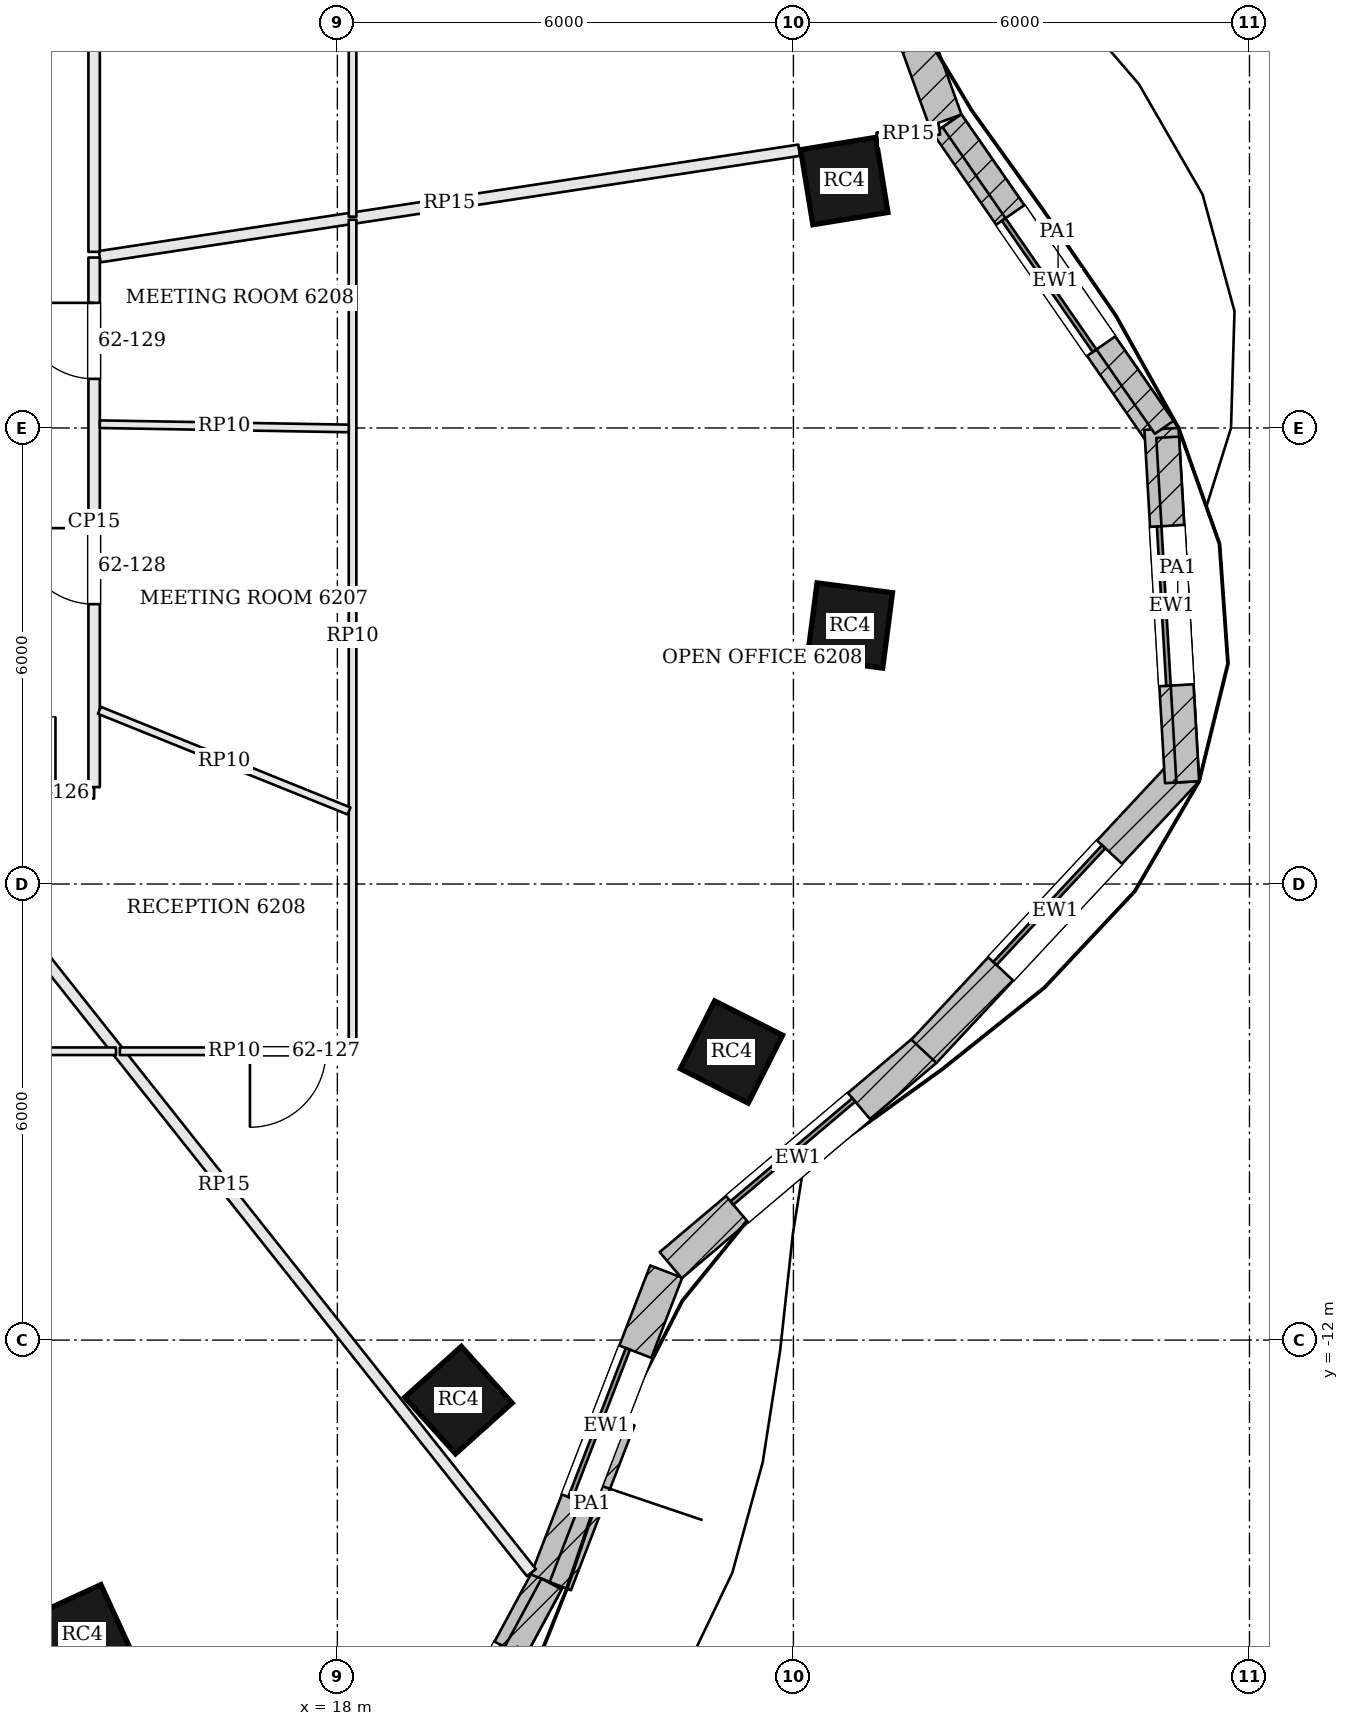
"""IFC4 building model, lengths in metres.
Left out: names, types, materials, properties, quantities, classifications, styles, units other than length and angle.
Written with IfcOpenShell. Run it as: python <this file> out.ifc"""

import sys

from ifc_helpers import new_model, si_unit, direction, frame, frame_2d, origin, origin_2d, place, context, subcontext, project, spatial, rectangle, extrude, element, fill, save


model = new_model("IFC4")
c1 = context("Model", 3, precision=1e-05, world=origin(), true_north=direction((0.0, 1.0)))
c2 = subcontext(c1, "Body", "Model", "MODEL_VIEW")
j1 = project(units=[si_unit("LENGTHUNIT", "METRE"), si_unit("PLANEANGLEUNIT", "RADIAN")], contexts=[c1])
p1 = place(None, origin())
s1 = spatial("IfcSite", under=j1, at=p1, CompositionType="ELEMENT")
p2 = place(p1, origin())
s2 = spatial("IfcBuilding", under=s1, at=p2, CompositionType="ELEMENT")
p3 = place(p2, frame((0.0, 0.0, 252.6)))
s3 = spatial("IfcBuildingStorey", under=s2, at=p3, CompositionType="ELEMENT", Elevation=252.6)
for number, where, z_axis, x_axis in (
    (1, (24.669, 3.248, 0.0), (0.0, 0.0, 1.0), (-0.162, 0.987, 0.0)),
    (2, (14.643, -15.881, 0.0), (0.0, 0.0, 1.0), (0.909, 0.417, 0.0)),
    (3, (19.593, -12.79, 0.0), (0.0, 0.0, 1.0), (0.744, 0.668, 0.0)),
    (4, (23.185, -8.21, 0.0), (0.0, 0.0, 1.0), (0.451, 0.893, 0.0)),
    (5, (24.743, -2.599, 0.0), (0.0, 0.0, 1.0), (0.128, 0.992, 0.0)),
):
    element("IfcColumn", number, at=place(p3, frame(where, z_axis=z_axis, x_axis=x_axis)), inside=s3, PredefinedType="COLUMN", context=c2, shape_type="SweptSolid", body=[
        extrude(rectangle(XDim=1.0, YDim=1.0, at=origin_2d()), origin(), (0.0, 0.0, 1.0), 3.9),
    ])
p4 = place(p3, frame((28.878, -0.123, 0.0), z_axis=(0.0, 0.0, 1.0), x_axis=(-0.569394732999, 0.8220642542, 0.0)))
e6 = element("IfcWall", 6, at=p4, inside=s3, PredefinedType="SOLIDWALL", context=c2, shape_type="SweptSolid", body=[
    extrude(rectangle(XDim=5.016, YDim=0.45, at=frame_2d((2.508, 0.0))), origin(), (0.0, 0.0, 1.0), 3.7),
])
p5 = place(p4, frame((1.458, 0.0, 0.9)))
e7 = element("IfcOpeningElement", 7, at=p5, cuts=e6, PredefinedType="OPENING", context=c2, shape_type="SweptSolid", body=[
    extrude(rectangle(XDim=2.1, YDim=2.3, at=frame_2d((1.05, 1.15))), frame((0.0, 0.235, 0.0), z_axis=(0.0, -1.0, 0.0), x_axis=(1.0, 0.0, 0.0)), (0.0, 0.0, 1.0), 0.47),
])
p6 = place(p3, frame((26.0, 4.047, 0.0), z_axis=(0.0, 0.0, 1.0), x_axis=(-0.338924456066, 0.940813591037, 0.0)))
e8 = element("IfcWall", 8, at=p6, inside=s3, PredefinedType="SOLIDWALL", context=c2, shape_type="SweptSolid", body=[
    extrude(rectangle(XDim=4.175, YDim=0.45, at=frame_2d((2.087, 0.0))), origin(), (0.0, 0.0, 1.0), 3.7),
])
p7 = place(p6, frame((1.038, 0.0, 0.9)))
e9 = element("IfcOpeningElement", 9, at=p7, cuts=e8, PredefinedType="OPENING", context=c2, shape_type="SweptSolid", body=[
    extrude(rectangle(XDim=2.1, YDim=2.3, at=frame_2d((1.05, 1.15))), frame((0.0, 0.235, 0.0), z_axis=(0.0, -1.0, 0.0), x_axis=(1.0, 0.0, 0.0)), (0.0, 0.0, 1.0), 0.47),
])
p8 = place(p3, frame((18.767, -18.854, 0.0), z_axis=(0.0, 0.0, 1.0), x_axis=(0.474475888716, 0.880268499395, 0.0)))
e10 = element("IfcWall", 10, at=p8, inside=s3, PredefinedType="SOLIDWALL", context=c2, shape_type="SweptSolid", body=[
    extrude(rectangle(XDim=4.219, YDim=0.45, at=frame_2d((2.11, 0.0))), origin(), (0.0, 0.0, 1.0), 3.7),
])
p9 = place(p8, frame((1.06, 0.0, 0.9)))
e11 = element("IfcOpeningElement", 11, at=p9, cuts=e10, PredefinedType="OPENING", context=c2, shape_type="SweptSolid", body=[
    extrude(rectangle(XDim=2.1, YDim=2.3, at=frame_2d((1.05, 1.15))), frame((0.0, 0.235, 0.0), z_axis=(0.0, -1.0, 0.0), x_axis=(1.0, 0.0, 0.0)), (0.0, 0.0, 1.0), 0.47),
])
p10 = place(p3, frame((20.757, -15.166, 0.0), z_axis=(0.0, 0.0, 1.0), x_axis=(0.360067043581, 0.932926430179, 0.0)))
e12 = element("IfcWall", 12, at=p10, inside=s3, PredefinedType="SOLIDWALL", context=c2, shape_type="SweptSolid", body=[
    extrude(rectangle(XDim=4.36, YDim=0.45, at=frame_2d((2.18, 0.0))), origin(), (0.0, 0.0, 1.0), 3.7),
])
p11 = place(p10, frame((1.13, 0.0, 0.9)))
e13 = element("IfcOpeningElement", 13, at=p11, cuts=e12, PredefinedType="OPENING", context=c2, shape_type="SweptSolid", body=[
    extrude(rectangle(XDim=2.1, YDim=2.3, at=frame_2d((1.05, 1.15))), frame((0.0, 0.235, 0.0), z_axis=(0.0, -1.0, 0.0), x_axis=(1.0, 0.0, 0.0)), (0.0, 0.0, 1.0), 0.47),
])
p12 = place(p3, frame((22.386, -11.014, 0.0), z_axis=(0.0, 0.0, 1.0), x_axis=(0.763569952162, 0.645725118108, 0.0)))
e14 = element("IfcWall", 14, at=p12, inside=s3, PredefinedType="SOLIDWALL", context=c2, shape_type="SweptSolid", body=[
    extrude(rectangle(XDim=4.386, YDim=0.45, at=frame_2d((2.193, 0.0))), origin(), (0.0, 0.0, 1.0), 3.7),
])
p13 = place(p12, frame((1.143, 0.0, 0.9)))
e15 = element("IfcOpeningElement", 15, at=p13, cuts=e14, PredefinedType="OPENING", context=c2, shape_type="SweptSolid", body=[
    extrude(rectangle(XDim=2.1, YDim=2.3, at=frame_2d((1.05, 1.15))), frame((0.0, 0.235, 0.0), z_axis=(0.0, -1.0, 0.0), x_axis=(1.0, 0.0, 0.0)), (0.0, 0.0, 1.0), 0.47),
])
p14 = place(p3, frame((25.717, -8.201, 0.0), z_axis=(0.0, 0.0, 1.0), x_axis=(0.681990073025, 0.731361429319, 0.0)))
e16 = element("IfcWall", 16, at=p14, inside=s3, PredefinedType="SOLIDWALL", context=c2, shape_type="SweptSolid", body=[
    extrude(rectangle(XDim=5.064, YDim=0.45, at=frame_2d((2.532, 0.0))), origin(), (0.0, 0.0, 1.0), 3.7),
])
p15 = place(p14, frame((1.482, 0.0, 0.9)))
e17 = element("IfcOpeningElement", 17, at=p15, cuts=e16, PredefinedType="OPENING", context=c2, shape_type="SweptSolid", body=[
    extrude(rectangle(XDim=2.1, YDim=2.3, at=frame_2d((1.05, 1.15))), frame((0.0, 0.235, 0.0), z_axis=(0.0, -1.0, 0.0), x_axis=(1.0, 0.0, 0.0)), (0.0, 0.0, 1.0), 0.47),
])
p16 = place(p3, frame((29.113, -4.66, 0.0), z_axis=(0.0, 0.0, 1.0), x_axis=(-0.058217785859, 0.998303906338, 0.0)))
e18 = element("IfcWall", 18, at=p16, inside=s3, PredefinedType="SOLIDWALL", context=c2, shape_type="SweptSolid", body=[
    extrude(rectangle(XDim=4.655, YDim=0.45, at=frame_2d((2.327, 0.0))), origin(), (0.0, 0.0, 1.0), 3.7),
])
p17 = place(p16, frame((1.277, 0.0, 0.9)))
e19 = element("IfcOpeningElement", 19, at=p17, cuts=e18, PredefinedType="OPENING", context=c2, shape_type="SweptSolid", body=[
    extrude(rectangle(XDim=2.1, YDim=2.3, at=frame_2d((1.05, 1.15))), frame((0.0, 0.235, 0.0), z_axis=(0.0, -1.0, 0.0), x_axis=(1.0, 0.0, 0.0)), (0.0, 0.0, 1.0), 0.47),
])
p18 = place(p3, frame((28.879, 0.009, 3.9), z_axis=(0.0, 0.0, 1.0), x_axis=(-0.569370412902, 0.822081098744, 0.0)))
e20 = element("IfcWall", 20, at=p18, inside=s3, PredefinedType="PARAPET", context=c2, shape_type="SweptSolid", body=[
    extrude(rectangle(XDim=4.906, YDim=0.3, at=frame_2d((2.453, 0.0))), origin(), (0.0, 0.0, 1.0), 1.1),
])
p19 = place(p3, frame((18.896, -18.773, 3.9), z_axis=(0.0, 0.0, 1.0), x_axis=(0.474444905835, 0.880285198857, 0.0)))
e21 = element("IfcWall", 21, at=p19, inside=s3, PredefinedType="PARAPET", context=c2, shape_type="SweptSolid", body=[
    extrude(rectangle(XDim=4.05, YDim=0.3, at=frame_2d((2.025, 0.0))), origin(), (0.0, 0.0, 1.0), 1.1),
])
p20 = place(p3, frame((20.933, -15.237, 3.9), z_axis=(0.0, 0.0, 1.0), x_axis=(0.360021038217, 0.932944184848, 0.0)))
e22 = element("IfcWall", 22, at=p20, inside=s3, PredefinedType="PARAPET", context=c2, shape_type="SweptSolid", body=[
    extrude(rectangle(XDim=2.323, YDim=0.3, at=frame_2d((1.162, 0.0))), origin(), (0.0, 0.0, 1.0), 1.1),
])
p21 = place(p3, frame((29.188, -4.656, 3.9), z_axis=(0.0, 0.0, 1.0), x_axis=(-0.058230319325, 0.998303175349, 0.0)))
e23 = element("IfcWall", 23, at=p21, inside=s3, PredefinedType="PARAPET", context=c2, shape_type="SweptSolid", body=[
    extrude(rectangle(XDim=4.541, YDim=0.3, at=frame_2d((2.271, 0.0))), origin(), (0.0, 0.0, 1.0), 1.1),
])
p22 = place(p3, frame((20.553, -15.059, 0.0), z_axis=(0.0, 0.0, 1.0), x_axis=(-0.621387168857, 0.783503660732, 0.0)))
e24 = element("IfcWall", 24, at=p22, inside=s3, PredefinedType="PARTITIONING", context=c2, shape_type="SweptSolid", body=[
    extrude(rectangle(XDim=13.019, YDim=0.15, at=frame_2d((6.51, 0.0))), origin(), (0.0, 0.0, 1.0), 3.084),
])
p23 = place(p3, frame((12.491, -4.8, 0.0), z_axis=(0.0, 0.0, 1.0), x_axis=(1.0, 0.0, 0.0)))
e25 = element("IfcWall", 25, at=p23, inside=s3, PredefinedType="PARTITIONING", context=c2, shape_type="SweptSolid", body=[
    extrude(rectangle(XDim=2.309, YDim=0.15, at=frame_2d((1.154, 0.0))), origin(), (0.0, 0.0, 1.0), 3.084),
])
p24 = place(p23, frame((0.8, 0.0, 0.0)))
e26 = element("IfcOpeningElement", 26, at=p24, cuts=e25, PredefinedType="OPENING", context=c2, shape_type="SweptSolid", body=[
    extrude(rectangle(XDim=1.0, YDim=2.1, at=frame_2d((0.5, 1.05))), frame((0.0, 0.085, 0.0), z_axis=(0.0, -1.0, 0.0), x_axis=(1.0, 0.0, 0.0)), (0.0, 0.0, 1.0), 0.17),
])
p25 = place(p3, frame((14.8, -4.725, 0.0), z_axis=(0.0, 0.0, 1.0), x_axis=(0.0, 1.0, 0.0)))
e27 = element("IfcWall", 27, at=p25, inside=s3, PredefinedType="PARTITIONING", context=c2, shape_type="SweptSolid", body=[
    extrude(rectangle(XDim=6.967, YDim=0.15, at=frame_2d((3.483, 0.0))), origin(), (0.0, 0.0, 1.0), 3.084),
])
p26 = place(p25, frame((2.407, 0.0, 0.0)))
e28 = element("IfcOpeningElement", 28, at=p26, cuts=e27, PredefinedType="OPENING", context=c2, shape_type="SweptSolid", body=[
    extrude(rectangle(XDim=1.0, YDim=2.4, at=frame_2d((0.5, 1.2))), frame((0.0, 0.085, 0.0), z_axis=(0.0, -1.0, 0.0), x_axis=(1.0, 0.0, 0.0)), (0.0, 0.0, 1.0), 0.17),
])
p27 = place(p25, frame((5.371, 0.0, 0.0)))
e29 = element("IfcOpeningElement", 29, at=p27, cuts=e27, PredefinedType="OPENING", context=c2, shape_type="SweptSolid", body=[
    extrude(rectangle(XDim=1.0, YDim=2.4, at=frame_2d((0.5, 1.2))), frame((0.0, 0.085, 0.0), z_axis=(0.0, -1.0, 0.0), x_axis=(1.0, 0.0, 0.0)), (0.0, 0.0, 1.0), 0.17),
])
p28 = place(p3, frame((25.92, 3.935, 0.0), z_axis=(0.0, 0.0, 1.0), x_axis=(-0.988606403982, -0.150523679218, 0.0)))
e30 = element("IfcWall", 30, at=p28, inside=s3, PredefinedType="PARTITIONING", context=c2, shape_type="SweptSolid", body=[
    extrude(rectangle(XDim=0.826, YDim=0.15, at=frame_2d((0.413, 0.0))), origin(), (0.0, 0.0, 1.0), 3.084),
])
p29 = place(p3, frame((24.076, 3.654, 0.0), z_axis=(0.0, 0.0, 1.0), x_axis=(-0.988612730302, -0.150482123474, 0.0)))
e31 = element("IfcWall", 31, at=p29, inside=s3, PredefinedType="PARTITIONING", context=c2, shape_type="SweptSolid", body=[
    extrude(rectangle(XDim=9.308, YDim=0.15, at=frame_2d((4.654, 0.0))), origin(), (0.0, 0.0, 1.0), 3.084),
])
p30 = place(p3, frame((14.8, 2.317, 0.0), z_axis=(0.0, 0.0, 1.0), x_axis=(0.0, 1.0, 0.0)))
e32 = element("IfcWall", 32, at=p30, inside=s3, PredefinedType="PARTITIONING", context=c2, shape_type="SweptSolid", body=[
    extrude(rectangle(XDim=11.483, YDim=0.15, at=frame_2d((5.742, 0.0))), origin(), (0.0, 0.0, 1.0), 3.084),
])
p31 = place(p30, frame((6.341, 0.0, 0.0)))
e33 = element("IfcOpeningElement", 33, at=p31, cuts=e32, PredefinedType="OPENING", context=c2, shape_type="SweptSolid", body=[
    extrude(rectangle(XDim=1.8, YDim=2.1, at=frame_2d((0.9, 1.05))), frame((0.0, 0.085, 0.0), z_axis=(0.0, -1.0, 0.0), x_axis=(1.0, 0.0, 0.0)), (0.0, 0.0, 1.0), 0.17),
])
p32 = place(p3, frame((15.087, -8.2, 0.0), z_axis=(0.0, 0.0, 1.0), x_axis=(-1.0, 0.0, 0.0)))
e34 = element("IfcWall", 34, at=p32, inside=s3, PredefinedType="PARTITIONING", context=c2, shape_type="SweptSolid", body=[
    extrude(rectangle(XDim=10.081, YDim=0.1, at=frame_2d((5.041, 0.0))), origin(), (0.0, 0.0, 1.0), 3.084),
])
p33 = place(p32, frame((6.841, 0.0, 0.0)))
e35 = element("IfcOpeningElement", 35, at=p33, cuts=e34, PredefinedType="OPENING", context=c2, shape_type="SweptSolid", body=[
    extrude(rectangle(XDim=1.0, YDim=2.1, at=frame_2d((0.5, 1.05))), frame((0.0, 0.06, 0.0), z_axis=(0.0, -1.0, 0.0), x_axis=(1.0, 0.0, 0.0)), (0.0, 0.0, 1.0), 0.12),
])
p34 = place(p3, frame((18.2, 2.74, 0.0), z_axis=(0.0, 0.0, 1.0), x_axis=(0.0, -1.0, 0.0)))
e36 = element("IfcWall", 36, at=p34, inside=s3, PredefinedType="PARTITIONING", context=c2, shape_type="SweptSolid", body=[
    extrude(rectangle(XDim=10.939, YDim=0.1, at=frame_2d((5.47, 0.0))), origin(), (0.0, 0.0, 1.0), 3.084),
])
p35 = place(p3, frame((18.15, -8.2, 0.0), z_axis=(0.0, 0.0, 1.0), x_axis=(-1.0, 0.0, 0.0)))
e37 = element("IfcWall", 37, at=p35, inside=s3, PredefinedType="PARTITIONING", context=c2, shape_type="SweptSolid", body=[
    extrude(rectangle(XDim=3.011, YDim=0.1, at=frame_2d((1.506, 0.0))), origin(), (0.0, 0.0, 1.0), 3.084),
])
p36 = place(p35, frame((0.3, 0.0, 0.0)))
e38 = element("IfcOpeningElement", 38, at=p36, cuts=e37, PredefinedType="OPENING", context=c2, shape_type="SweptSolid", body=[
    extrude(rectangle(XDim=1.0, YDim=2.1, at=frame_2d((0.5, 1.05))), frame((0.0, 0.06, 0.0), z_axis=(0.0, -1.0, 0.0), x_axis=(1.0, 0.0, 0.0)), (0.0, 0.0, 1.0), 0.12),
])
p37 = place(p3, frame((14.87, -3.715, 0.0), z_axis=(0.0, 0.0, 1.0), x_axis=(0.927460371053, -0.37392146251, 0.0)))
e39 = element("IfcWall", 39, at=p37, inside=s3, PredefinedType="PARTITIONING", context=c2, shape_type="SweptSolid", body=[
    extrude(rectangle(XDim=3.541, YDim=0.1, at=frame_2d((1.771, 0.0))), origin(), (0.0, 0.0, 1.0), 3.084),
])
p38 = place(p3, frame((14.875, 0.049, 0.0), z_axis=(0.0, 0.0, 1.0), x_axis=(0.999854310099, -0.017069228941, 0.0)))
e40 = element("IfcWall", 40, at=p38, inside=s3, PredefinedType="PARTITIONING", context=c2, shape_type="SweptSolid", body=[
    extrude(rectangle(XDim=3.275, YDim=0.1, at=frame_2d((1.638, 0.0))), origin(), (0.0, 0.0, 1.0), 3.084),
])
p39 = place(p3, frame((18.2, 14.262, 0.0), z_axis=(0.0, 0.0, 1.0), x_axis=(0.0, -1.0, 0.0)))
e41 = element("IfcWall", 41, at=p39, inside=s3, PredefinedType="PARTITIONING", context=c2, shape_type="SweptSolid", body=[
    extrude(rectangle(XDim=11.482, YDim=0.1, at=frame_2d((5.741, 0.0))), origin(), (0.0, 0.0, 1.0), 3.084),
])
p40 = place(p39, frame((7.25, 0.0, 0.0)))
e42 = element("IfcOpeningElement", 42, at=p40, cuts=e41, PredefinedType="OPENING", context=c2, shape_type="SweptSolid", body=[
    extrude(rectangle(XDim=1.0, YDim=2.1, at=frame_2d((0.5, 1.05))), frame((0.0, 0.06, 0.0), z_axis=(0.0, -1.0, 0.0), x_axis=(1.0, 0.0, 0.0)), (0.0, 0.0, 1.0), 0.12),
])
p41 = place(p5, origin())
e43 = element("IfcWindow", 43, at=p41, inside=s3, PartitioningType="SINGLE_PANEL", PredefinedType="WINDOW", context=c2, shape_type="SweptSolid", body=[
    extrude(rectangle(XDim=2.1, YDim=2.3, at=frame_2d((1.05, 1.15))), frame((0.0, 0.135, 0.0), z_axis=(0.0, -1.0, 0.0), x_axis=(1.0, 0.0, 0.0)), (0.0, 0.0, 1.0), 0.06),
])
fill(e7, e43)
p42 = place(p9, origin())
e44 = element("IfcWindow", 44, at=p42, inside=s3, PartitioningType="SINGLE_PANEL", PredefinedType="WINDOW", context=c2, shape_type="SweptSolid", body=[
    extrude(rectangle(XDim=2.1, YDim=2.3, at=frame_2d((1.05, 1.15))), frame((0.0, 0.135, 0.0), z_axis=(0.0, -1.0, 0.0), x_axis=(1.0, 0.0, 0.0)), (0.0, 0.0, 1.0), 0.06),
])
fill(e11, e44)
p43 = place(p11, origin())
e45 = element("IfcWindow", 45, at=p43, inside=s3, PartitioningType="SINGLE_PANEL", PredefinedType="WINDOW", context=c2, shape_type="SweptSolid", body=[
    extrude(rectangle(XDim=2.1, YDim=2.3, at=frame_2d((1.05, 1.15))), frame((0.0, 0.135, 0.0), z_axis=(0.0, -1.0, 0.0), x_axis=(1.0, 0.0, 0.0)), (0.0, 0.0, 1.0), 0.06),
])
fill(e13, e45)
p44 = place(p13, origin())
e46 = element("IfcWindow", 46, at=p44, inside=s3, PartitioningType="SINGLE_PANEL", PredefinedType="WINDOW", context=c2, shape_type="SweptSolid", body=[
    extrude(rectangle(XDim=2.1, YDim=2.3, at=frame_2d((1.05, 1.15))), frame((0.0, 0.135, 0.0), z_axis=(0.0, -1.0, 0.0), x_axis=(1.0, 0.0, 0.0)), (0.0, 0.0, 1.0), 0.06),
])
fill(e15, e46)
p45 = place(p15, origin())
e47 = element("IfcWindow", 47, at=p45, inside=s3, PartitioningType="SINGLE_PANEL", PredefinedType="WINDOW", context=c2, shape_type="SweptSolid", body=[
    extrude(rectangle(XDim=2.1, YDim=2.3, at=frame_2d((1.05, 1.15))), frame((0.0, 0.135, 0.0), z_axis=(0.0, -1.0, 0.0), x_axis=(1.0, 0.0, 0.0)), (0.0, 0.0, 1.0), 0.06),
])
fill(e17, e47)
p46 = place(p17, origin())
e48 = element("IfcWindow", 48, at=p46, inside=s3, PartitioningType="SINGLE_PANEL", PredefinedType="WINDOW", context=c2, shape_type="SweptSolid", body=[
    extrude(rectangle(XDim=2.1, YDim=2.3, at=frame_2d((1.05, 1.15))), frame((0.0, 0.135, 0.0), z_axis=(0.0, -1.0, 0.0), x_axis=(1.0, 0.0, 0.0)), (0.0, 0.0, 1.0), 0.06),
])
fill(e19, e48)
p47 = place(p24, origin())
e49 = element("IfcDoor", 49, at=p47, inside=s3, OperationType="SINGLE_SWING_RIGHT", PredefinedType="DOOR", context=c2, shape_type="SweptSolid", body=[
    extrude(rectangle(XDim=1.0, YDim=2.1, at=frame_2d((0.5, 1.05))), frame((0.0, 0.025, 0.0), z_axis=(0.0, -1.0, 0.0), x_axis=(1.0, 0.0, 0.0)), (0.0, 0.0, 1.0), 0.05),
])
fill(e26, e49)
p48 = place(p36, origin())
e50 = element("IfcDoor", 50, at=p48, inside=s3, OperationType="SINGLE_SWING_RIGHT", PredefinedType="DOOR", context=c2, shape_type="SweptSolid", body=[
    extrude(rectangle(XDim=1.0, YDim=2.1, at=frame_2d((0.5, 1.05))), frame((0.0, 0.025, 0.0), z_axis=(0.0, -1.0, 0.0), x_axis=(1.0, 0.0, 0.0)), (0.0, 0.0, 1.0), 0.05),
])
fill(e38, e50)
p49 = place(p26, origin())
e51 = element("IfcDoor", 51, at=p49, inside=s3, OperationType="SINGLE_SWING_RIGHT", PredefinedType="DOOR", context=c2, shape_type="SweptSolid", body=[
    extrude(rectangle(XDim=1.0, YDim=2.4, at=frame_2d((0.5, 1.2))), frame((0.0, 0.025, 0.0), z_axis=(0.0, -1.0, 0.0), x_axis=(1.0, 0.0, 0.0)), (0.0, 0.0, 1.0), 0.05),
])
fill(e28, e51)
p50 = place(p27, origin())
e52 = element("IfcDoor", 52, at=p50, inside=s3, OperationType="SINGLE_SWING_RIGHT", PredefinedType="DOOR", context=c2, shape_type="SweptSolid", body=[
    extrude(rectangle(XDim=1.0, YDim=2.4, at=frame_2d((0.5, 1.2))), frame((0.0, 0.025, 0.0), z_axis=(0.0, -1.0, 0.0), x_axis=(1.0, 0.0, 0.0)), (0.0, 0.0, 1.0), 0.05),
])
fill(e29, e52)
save(model, sys.argv[1])
